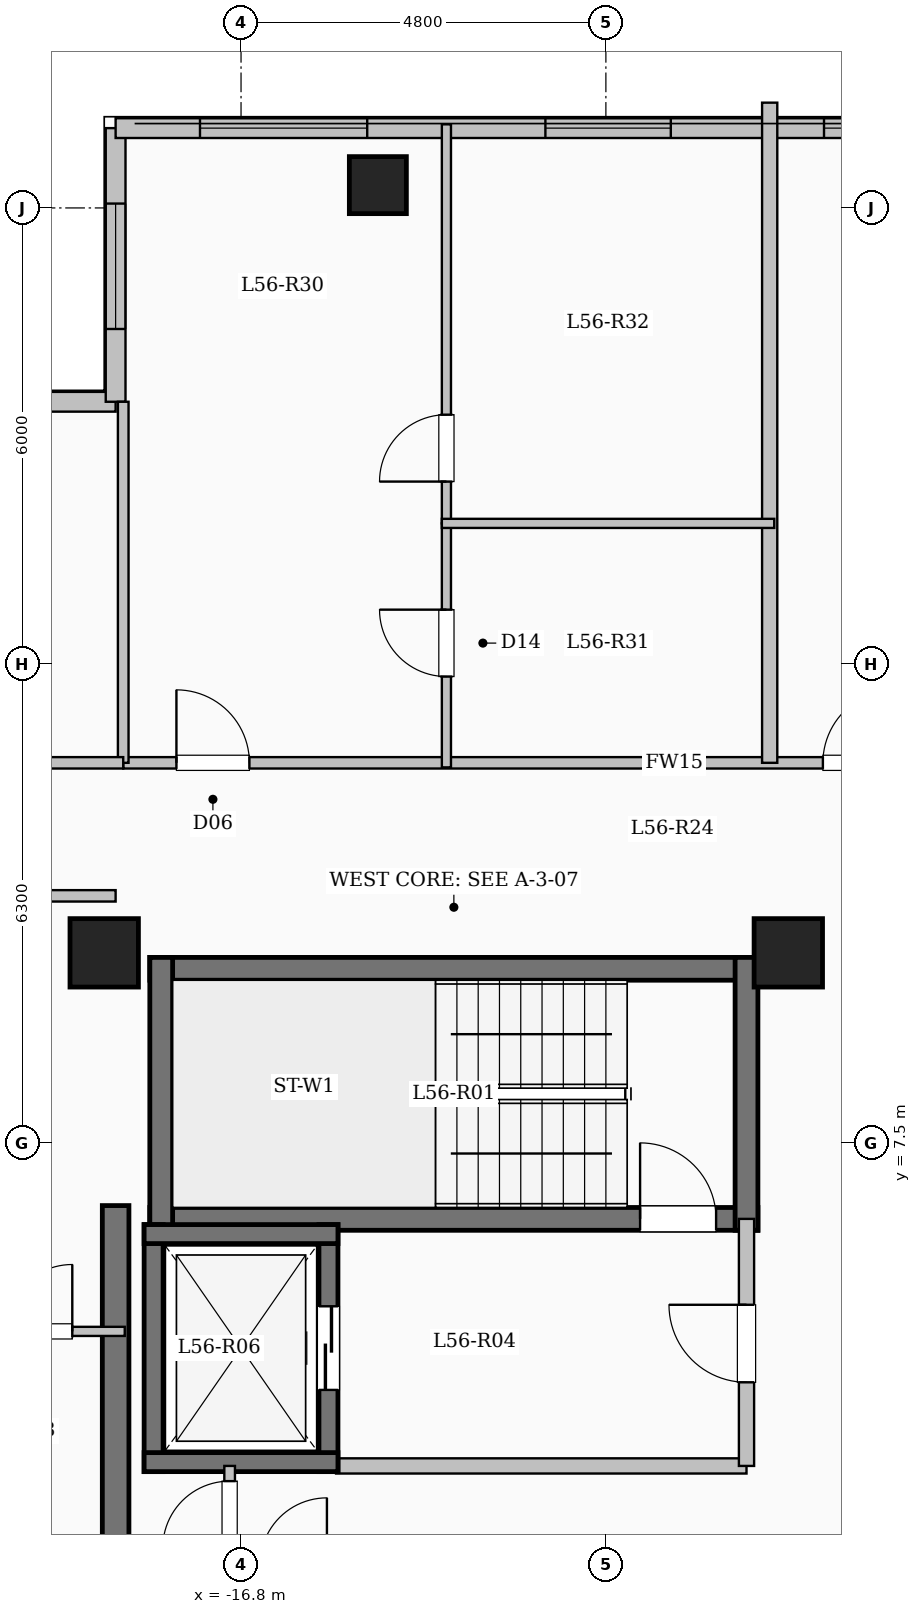
"""IFC4 building model, lengths in metres.
Left out: names, types, materials, properties, quantities, classifications, styles, units other than length and angle.
Written with IfcOpenShell. Run it as: python <this file> out.ifc"""

import sys

from ifc_helpers import new_model, si_unit, direction, frame, frame_2d, origin, origin_2d, place, context, subcontext, project, spatial, rectangle, extrude, element, fill, save


model = new_model("IFC4")
c1 = context("Model", 3, precision=1e-05, world=origin(), true_north=direction((0.0, 1.0)))
c2 = subcontext(c1, "Body", "Model", "MODEL_VIEW")
j1 = project(units=[si_unit("LENGTHUNIT", "METRE"), si_unit("PLANEANGLEUNIT", "RADIAN")], contexts=[c1])
p1 = place(None, origin())
s1 = spatial("IfcSite", under=j1, at=p1, CompositionType="ELEMENT")
p2 = place(p1, origin())
s2 = spatial("IfcBuilding", under=s1, at=p2, CompositionType="ELEMENT")
p3 = place(p2, frame((0.0, 0.0, 207.0)))
s3 = spatial("IfcBuildingStorey", under=s2, at=p3, CompositionType="ELEMENT", Elevation=207.0)
for number, where, z_axis, x_axis in (
    (1, (-9.6, 10.0, 0.0), (0.0, 0.0, 1.0), (1.0, 0.0, 0.0)),
    (2, (-18.6, 10.0, 0.0), (0.0, 0.0, 1.0), (1.0, 0.0, 0.0)),
):
    element("IfcColumn", number, at=place(p3, frame(where, z_axis=z_axis, x_axis=x_axis)), inside=s3, PredefinedType="COLUMN", context=c2, shape_type="SweptSolid", body=[
        extrude(rectangle(XDim=0.9, YDim=0.9, at=origin_2d()), origin(), (0.0, 0.0, 1.0), 3.35),
    ])
p4 = place(p3, frame((-15.0, 20.1, 0.0), z_axis=(0.0, 0.0, 1.0), x_axis=(1.0, 0.0, 0.0)))
e3 = element("IfcColumn", 3, at=p4, inside=s3, PredefinedType="COLUMN", context=c2, shape_type="SweptSolid", body=[
    extrude(rectangle(XDim=0.75, YDim=0.75, at=origin_2d()), origin(), (0.0, 0.0, 1.0), 3.35),
])
p5 = place(p3, frame((-23.55, 17.25, 0.0), z_axis=(0.0, 0.0, 1.0), x_axis=(1.0, 0.0, 0.0)))
e4 = element("IfcWall", 4, at=p5, inside=s3, PredefinedType="SOLIDWALL", context=c2, shape_type="SweptSolid", body=[
    extrude(rectangle(XDim=5.1, YDim=0.26, at=frame_2d((2.55, 0.0))), origin(), (0.0, 0.0, 1.0), 3.1),
])
p6 = place(p5, frame((1.575, 0.0, 0.9)))
e5 = element("IfcOpeningElement", 5, at=p6, cuts=e4, PredefinedType="OPENING", context=c2, shape_type="SweptSolid", body=[
    extrude(rectangle(XDim=2.0, YDim=1.7, at=frame_2d((1.0, 0.85))), frame((0.0, 0.14, 0.0), z_axis=(0.0, -1.0, 0.0), x_axis=(1.0, 0.0, 0.0)), (0.0, 0.0, 1.0), 0.28),
])
p7 = place(p3, frame((-18.45, 17.25, 0.0), z_axis=(0.0, 0.0, 1.0), x_axis=(0.0, 1.0, 0.0)))
e6 = element("IfcWall", 6, at=p7, inside=s3, PredefinedType="SOLIDWALL", context=c2, shape_type="SweptSolid", body=[
    extrude(rectangle(XDim=3.6, YDim=0.26, at=frame_2d((1.8, 0.0))), origin(), (0.0, 0.0, 1.0), 3.1),
])
p8 = place(p7, frame((0.958, 0.0, 0.9)))
e7 = element("IfcOpeningElement", 7, at=p8, cuts=e6, PredefinedType="OPENING", context=c2, shape_type="SweptSolid", body=[
    extrude(rectangle(XDim=1.65, YDim=1.6, at=frame_2d((0.825, 0.8))), frame((0.0, 0.14, 0.0), z_axis=(0.0, -1.0, 0.0), x_axis=(1.0, 0.0, 0.0)), (0.0, 0.0, 1.0), 0.28),
])
p9 = place(p3, frame((-18.45, 20.85, 0.0), z_axis=(0.0, 0.0, 1.0), x_axis=(1.0, 0.0, 0.0)))
e8 = element("IfcWall", 8, at=p9, inside=s3, PredefinedType="SOLIDWALL", context=c2, shape_type="SweptSolid", body=[
    extrude(rectangle(XDim=11.1, YDim=0.26, at=frame_2d((5.55, 0.0))), origin(), (0.0, 0.0, 1.0), 3.1),
])
p10 = place(p9, frame((1.11, 0.0, 0.9)))
e9 = element("IfcOpeningElement", 9, at=p10, cuts=e8, PredefinedType="OPENING", context=c2, shape_type="SweptSolid", body=[
    extrude(rectangle(XDim=2.2, YDim=1.75, at=frame_2d((1.1, 0.875))), frame((0.0, 0.14, 0.0), z_axis=(0.0, -1.0, 0.0), x_axis=(1.0, 0.0, 0.0)), (0.0, 0.0, 1.0), 0.28),
])
p11 = place(p9, frame((5.654, 0.0, 0.9)))
e10 = element("IfcOpeningElement", 10, at=p11, cuts=e8, PredefinedType="OPENING", context=c2, shape_type="SweptSolid", body=[
    extrude(rectangle(XDim=1.65, YDim=1.6, at=frame_2d((0.825, 0.8))), frame((0.0, 0.14, 0.0), z_axis=(0.0, -1.0, 0.0), x_axis=(1.0, 0.0, 0.0)), (0.0, 0.0, 1.0), 0.28),
])
p12 = place(p9, frame((9.32, 0.0, 0.95)))
e11 = element("IfcOpeningElement", 11, at=p12, cuts=e8, PredefinedType="OPENING", context=c2, shape_type="SweptSolid", body=[
    extrude(rectangle(XDim=1.2, YDim=1.5, at=frame_2d((0.6, 0.75))), frame((0.0, 0.14, 0.0), z_axis=(0.0, -1.0, 0.0), x_axis=(1.0, 0.0, 0.0)), (0.0, 0.0, 1.0), 0.28),
])
p13 = place(p3, frame((-18.0, 9.79, 0.0), z_axis=(0.0, 0.0, 1.0), x_axis=(1.0, 0.0, 0.0)))
e12 = element("IfcWall", 12, at=p13, inside=s3, PredefinedType="SHEAR", context=c2, shape_type="SweptSolid", body=[
    extrude(rectangle(XDim=8.0, YDim=0.3, at=frame_2d((4.0, 0.0))), origin(), (0.0, 0.0, 1.0), 3.35),
])
p14 = place(p3, frame((-18.0, 6.5, 0.0), z_axis=(0.0, 0.0, 1.0), x_axis=(1.0, 0.0, 0.0)))
e13 = element("IfcWall", 13, at=p14, inside=s3, PredefinedType="SHEAR", context=c2, shape_type="SweptSolid", body=[
    extrude(rectangle(XDim=8.0, YDim=0.3, at=frame_2d((4.0, 0.0))), origin(), (0.0, 0.0, 1.0), 3.35),
])
p15 = place(p14, frame((6.45, 0.0, 0.0)))
e14 = element("IfcOpeningElement", 14, at=p15, cuts=e13, PredefinedType="OPENING", context=c2, shape_type="SweptSolid", body=[
    extrude(rectangle(XDim=1.0, YDim=2.15, at=frame_2d((0.5, 1.075))), frame((0.0, 0.16, 0.0), z_axis=(0.0, -1.0, 0.0), x_axis=(1.0, 0.0, 0.0)), (0.0, 0.0, 1.0), 0.32),
])
for number, where, z_axis, x_axis in (
    (15, (-17.85, 6.35, 0.0), (0.0, 0.0, 1.0), (0.0, 1.0, 0.0)),
    (16, (-10.15, 6.35, 0.0), (0.0, 0.0, 1.0), (0.0, 1.0, 0.0)),
):
    element("IfcWall", number, at=place(p3, frame(where, z_axis=z_axis, x_axis=x_axis)), inside=s3, PredefinedType="SHEAR", context=c2, shape_type="SweptSolid", body=[
        extrude(rectangle(XDim=3.59, YDim=0.3, at=frame_2d((1.795, 0.0))), origin(), (0.0, 0.0, 1.0), 3.35),
    ])
p16 = place(p3, frame((-15.55, 3.25, 0.0), z_axis=(0.0, 0.0, 1.0), x_axis=(1.0, 0.0, 0.0)))
e17 = element("IfcWall", 17, at=p16, inside=s3, PredefinedType="SOLIDWALL", context=c2, shape_type="SweptSolid", body=[
    extrude(rectangle(XDim=5.4, YDim=0.2, at=frame_2d((2.7, 0.0))), origin(), (0.0, 0.0, 1.0), 3.1),
])
p17 = place(p3, frame((-10.15, 3.25, 0.0), z_axis=(0.0, 0.0, 1.0), x_axis=(0.0, 1.0, 0.0)))
e18 = element("IfcWall", 18, at=p17, inside=s3, PredefinedType="SOLIDWALL", context=c2, shape_type="SweptSolid", body=[
    extrude(rectangle(XDim=3.25, YDim=0.2, at=frame_2d((1.625, 0.0))), origin(), (0.0, 0.0, 1.0), 3.1),
])
p18 = place(p17, frame((1.1, 0.0, 0.0)))
e19 = element("IfcOpeningElement", 19, at=p18, cuts=e18, PredefinedType="OPENING", context=c2, shape_type="SweptSolid", body=[
    extrude(rectangle(XDim=1.02, YDim=2.15, at=frame_2d((0.51, 1.075))), frame((0.0, 0.11, 0.0), z_axis=(0.0, -1.0, 0.0), x_axis=(1.0, 0.0, 0.0)), (0.0, 0.0, 1.0), 0.22),
])
p19 = place(p3, frame((-17.95, 3.175, 0.0), z_axis=(0.0, 0.0, 1.0), x_axis=(0.0, 1.0, 0.0)))
e20 = element("IfcWall", 20, at=p19, inside=s3, PredefinedType="SHEAR", context=c2, shape_type="SweptSolid", body=[
    extrude(rectangle(XDim=3.25, YDim=0.25, at=frame_2d((1.625, 0.0))), origin(), (0.0, 0.0, 1.0), 3.35),
])
p20 = place(p3, frame((-15.65, 3.175, 0.0), z_axis=(0.0, 0.0, 1.0), x_axis=(0.0, 1.0, 0.0)))
e21 = element("IfcWall", 21, at=p20, inside=s3, PredefinedType="SHEAR", context=c2, shape_type="SweptSolid", body=[
    extrude(rectangle(XDim=3.25, YDim=0.25, at=frame_2d((1.625, 0.0))), origin(), (0.0, 0.0, 1.0), 3.35),
])
p21 = place(p20, frame((1.075, 0.0, 0.0)))
e22 = element("IfcOpeningElement", 22, at=p21, cuts=e21, PredefinedType="OPENING", context=c2, shape_type="SweptSolid", body=[
    extrude(rectangle(XDim=1.1, YDim=2.15, at=frame_2d((0.55, 1.075))), frame((0.0, 0.135, 0.0), z_axis=(0.0, -1.0, 0.0), x_axis=(1.0, 0.0, 0.0)), (0.0, 0.0, 1.0), 0.27),
])
for number, where, z_axis, x_axis in (
    (23, (-18.075, 3.3, 0.0), (0.0, 0.0, 1.0), (1.0, 0.0, 0.0)),
    (24, (-18.075, 6.3, 0.0), (0.0, 0.0, 1.0), (1.0, 0.0, 0.0)),
):
    element("IfcWall", number, at=place(p3, frame(where, z_axis=z_axis, x_axis=x_axis)), inside=s3, PredefinedType="SHEAR", context=c2, shape_type="SweptSolid", body=[
        extrude(rectangle(XDim=2.55, YDim=0.25, at=frame_2d((1.275, 0.0))), origin(), (0.0, 0.0, 1.0), 3.35),
    ])
p22 = place(p3, frame((-18.45, -7.375, 0.0), z_axis=(0.0, 0.0, 1.0), x_axis=(0.0, 1.0, 0.0)))
e25 = element("IfcWall", 25, at=p22, inside=s3, PredefinedType="SHEAR", context=c2, shape_type="SweptSolid", body=[
    extrude(rectangle(XDim=14.05, YDim=0.35, at=frame_2d((7.025, 0.0))), origin(), (0.0, 0.0, 1.0), 3.35),
])
p23 = place(p3, frame((-16.95, 1.95, 0.0), z_axis=(0.0, 0.0, 1.0), x_axis=(0.0, 1.0, 0.0)))
e26 = element("IfcWall", 26, at=p23, inside=s3, PredefinedType="PARTITIONING", context=c2, shape_type="SweptSolid", body=[
    extrude(rectangle(XDim=1.3, YDim=0.14, at=frame_2d((0.65, 0.0))), origin(), (0.0, 0.0, 1.0), 3.1),
])
p24 = place(p23, frame((0.22, 0.0, 0.0)))
e27 = element("IfcOpeningElement", 27, at=p24, cuts=e26, PredefinedType="OPENING", context=c2, shape_type="SweptSolid", body=[
    extrude(rectangle(XDim=0.88, YDim=2.1, at=frame_2d((0.44, 1.05))), frame((0.0, 0.08, 0.0), z_axis=(0.0, -1.0, 0.0), x_axis=(1.0, 0.0, 0.0)), (0.0, 0.0, 1.0), 0.16),
])
p25 = place(p3, frame((-18.35, 12.5, 0.0), z_axis=(0.0, 0.0, 1.0), x_axis=(1.0, 0.0, 0.0)))
e28 = element("IfcWall", 28, at=p25, inside=s3, PredefinedType="PARTITIONING", context=c2, shape_type="SweptSolid", body=[
    extrude(rectangle(XDim=14.5, YDim=0.15, at=frame_2d((7.25, 0.0))), origin(), (0.0, 0.0, 1.0), 3.1),
])
p26 = place(p25, frame((0.7, 0.0, 0.0)))
e29 = element("IfcOpeningElement", 29, at=p26, cuts=e28, PredefinedType="OPENING", context=c2, shape_type="SweptSolid", body=[
    extrude(rectangle(XDim=0.96, YDim=2.15, at=frame_2d((0.48, 1.075))), frame((0.0, 0.085, 0.0), z_axis=(0.0, -1.0, 0.0), x_axis=(1.0, 0.0, 0.0)), (0.0, 0.0, 1.0), 0.17),
])
p27 = place(p25, frame((9.205, 0.0, 0.0)))
e30 = element("IfcOpeningElement", 30, at=p27, cuts=e28, PredefinedType="OPENING", context=c2, shape_type="SweptSolid", body=[
    extrude(rectangle(XDim=0.96, YDim=2.15, at=frame_2d((0.48, 1.075))), frame((0.0, 0.085, 0.0), z_axis=(0.0, -1.0, 0.0), x_axis=(1.0, 0.0, 0.0)), (0.0, 0.0, 1.0), 0.17),
])
p28 = place(p3, frame((-9.845, 12.5, 0.0), z_axis=(0.0, 0.0, 1.0), x_axis=(0.0, 1.0, 0.0)))
e31 = element("IfcWall", 31, at=p28, inside=s3, PredefinedType="SOLIDWALL", context=c2, shape_type="SweptSolid", body=[
    extrude(rectangle(XDim=8.685, YDim=0.2, at=frame_2d((4.343, 0.0))), origin(), (0.0, 0.0, 1.0), 3.1),
])
p29 = place(p3, frame((-14.098, 12.44, 0.0), z_axis=(0.0, 0.0, 1.0), x_axis=(0.0, 1.0, 0.0)))
e32 = element("IfcWall", 32, at=p29, inside=s3, PredefinedType="PARTITIONING", context=c2, shape_type="SweptSolid", body=[
    extrude(rectangle(XDim=3.21, YDim=0.12, at=frame_2d((1.605, 0.0))), origin(), (0.0, 0.0, 1.0), 3.1),
])
p30 = place(p29, frame((1.195, 0.0, 0.0)))
e33 = element("IfcOpeningElement", 33, at=p30, cuts=e32, PredefinedType="OPENING", context=c2, shape_type="SweptSolid", body=[
    extrude(rectangle(XDim=0.88, YDim=2.1, at=frame_2d((0.44, 1.05))), frame((0.0, 0.07, 0.0), z_axis=(0.0, -1.0, 0.0), x_axis=(1.0, 0.0, 0.0)), (0.0, 0.0, 1.0), 0.14),
])
p31 = place(p3, frame((-14.098, 15.65, 0.0), z_axis=(0.0, 0.0, 1.0), x_axis=(0.0, 1.0, 0.0)))
e34 = element("IfcWall", 34, at=p31, inside=s3, PredefinedType="PARTITIONING", context=c2, shape_type="SweptSolid", body=[
    extrude(rectangle(XDim=5.25, YDim=0.12, at=frame_2d((2.625, 0.0))), origin(), (0.0, 0.0, 1.0), 3.1),
])
p32 = place(p31, frame((0.55, 0.0, 0.0)))
e35 = element("IfcOpeningElement", 35, at=p32, cuts=e34, PredefinedType="OPENING", context=c2, shape_type="SweptSolid", body=[
    extrude(rectangle(XDim=0.88, YDim=2.1, at=frame_2d((0.44, 1.05))), frame((0.0, 0.07, 0.0), z_axis=(0.0, -1.0, 0.0), x_axis=(1.0, 0.0, 0.0)), (0.0, 0.0, 1.0), 0.14),
])
p33 = place(p3, frame((-14.158, 15.65, 0.0), z_axis=(0.0, 0.0, 1.0), x_axis=(1.0, 0.0, 0.0)))
e36 = element("IfcWall", 36, at=p33, inside=s3, PredefinedType="PARTITIONING", context=c2, shape_type="SweptSolid", body=[
    extrude(rectangle(XDim=4.373, YDim=0.12, at=frame_2d((2.187, 0.0))), origin(), (0.0, 0.0, 1.0), 2.725),
])
p34 = place(p3, frame((-23.58, 10.75, 0.0), z_axis=(0.0, 0.0, 1.0), x_axis=(1.0, 0.0, 0.0)))
e37 = element("IfcWall", 37, at=p34, inside=s3, PredefinedType="PARTITIONING", context=c2, shape_type="SweptSolid", body=[
    extrude(rectangle(XDim=5.13, YDim=0.15, at=frame_2d((2.565, 0.0))), origin(), (0.0, 0.0, 1.0), 3.1),
])
p35 = place(p3, frame((-18.35, 12.5, 0.0), z_axis=(0.0, 0.0, 1.0), x_axis=(0.0, 1.0, 0.0)))
e38 = element("IfcWall", 38, at=p35, inside=s3, PredefinedType="PARTITIONING", context=c2, shape_type="SweptSolid", body=[
    extrude(rectangle(XDim=4.75, YDim=0.14, at=frame_2d((2.375, 0.0))), origin(), (0.0, 0.0, 1.0), 3.1),
])
p36 = place(p3, frame((-23.58, 12.5, 0.0), z_axis=(0.0, 0.0, 1.0), x_axis=(1.0, 0.0, 0.0)))
e39 = element("IfcWall", 39, at=p36, inside=s3, PredefinedType="PARTITIONING", context=c2, shape_type="SweptSolid", body=[
    extrude(rectangle(XDim=5.23, YDim=0.15, at=frame_2d((2.615, 0.0))), origin(), (0.0, 0.0, 1.0), 3.1),
])
p37 = place(p36, frame((2.14, 0.0, 0.0)))
e40 = element("IfcOpeningElement", 40, at=p37, cuts=e39, PredefinedType="OPENING", context=c2, shape_type="SweptSolid", body=[
    extrude(rectangle(XDim=0.95, YDim=2.15, at=frame_2d((0.475, 1.075))), frame((0.0, 0.085, 0.0), z_axis=(0.0, -1.0, 0.0), x_axis=(1.0, 0.0, 0.0)), (0.0, 0.0, 1.0), 0.17),
])
p38 = place(p3, frame((-23.7, 5.02, 0.0), z_axis=(0.0, 0.0, 1.0), x_axis=(1.0, 0.0, 0.0)))
e41 = element("IfcWall", 41, at=p38, inside=s3, PredefinedType="PARTITIONING", context=c2, shape_type="SweptSolid", body=[
    extrude(rectangle(XDim=5.37, YDim=0.12, at=frame_2d((2.685, 0.0))), origin(), (0.0, 0.0, 1.0), 3.1),
])
p39 = place(p38, frame((3.8, 0.0, 0.0)))
e42 = element("IfcOpeningElement", 42, at=p39, cuts=e41, PredefinedType="OPENING", context=c2, shape_type="SweptSolid", body=[
    extrude(rectangle(XDim=0.88, YDim=2.1, at=frame_2d((0.44, 1.05))), frame((0.0, 0.07, 0.0), z_axis=(0.0, -1.0, 0.0), x_axis=(1.0, 0.0, 0.0)), (0.0, 0.0, 1.0), 0.14),
])
p40 = place(p8, origin())
e43 = element("IfcWindow", 43, at=p40, inside=s3, PartitioningType="SINGLE_PANEL", PredefinedType="WINDOW", context=c2, shape_type="SweptSolid", body=[
    extrude(rectangle(XDim=1.65, YDim=1.6, at=frame_2d((0.825, 0.8))), frame((0.0, 0.03, 0.0), z_axis=(0.0, -1.0, 0.0), x_axis=(1.0, 0.0, 0.0)), (0.0, 0.0, 1.0), 0.06),
])
fill(e7, e43)
p41 = place(p10, origin())
e44 = element("IfcWindow", 44, at=p41, inside=s3, PartitioningType="SINGLE_PANEL", PredefinedType="WINDOW", context=c2, shape_type="SweptSolid", body=[
    extrude(rectangle(XDim=2.2, YDim=1.75, at=frame_2d((1.1, 0.875))), frame((0.0, 0.03, 0.0), z_axis=(0.0, -1.0, 0.0), x_axis=(1.0, 0.0, 0.0)), (0.0, 0.0, 1.0), 0.06),
])
fill(e9, e44)
p42 = place(p11, origin())
e45 = element("IfcWindow", 45, at=p42, inside=s3, PartitioningType="SINGLE_PANEL", PredefinedType="WINDOW", context=c2, shape_type="SweptSolid", body=[
    extrude(rectangle(XDim=1.65, YDim=1.6, at=frame_2d((0.825, 0.8))), frame((0.0, 0.03, 0.0), z_axis=(0.0, -1.0, 0.0), x_axis=(1.0, 0.0, 0.0)), (0.0, 0.0, 1.0), 0.06),
])
fill(e10, e45)
p43 = place(p12, origin())
e46 = element("IfcWindow", 46, at=p43, inside=s3, PartitioningType="SINGLE_PANEL", PredefinedType="WINDOW", context=c2, shape_type="SweptSolid", body=[
    extrude(rectangle(XDim=1.2, YDim=1.5, at=frame_2d((0.6, 0.75))), frame((0.0, 0.03, 0.0), z_axis=(0.0, -1.0, 0.0), x_axis=(1.0, 0.0, 0.0)), (0.0, 0.0, 1.0), 0.06),
])
fill(e11, e46)
p44 = place(p15, origin())
e47 = element("IfcDoor", 47, at=p44, inside=s3, OperationType="SINGLE_SWING_LEFT", PredefinedType="DOOR", context=c2, shape_type="SweptSolid", body=[
    extrude(rectangle(XDim=1.0, YDim=2.15, at=frame_2d((0.5, 1.075))), frame((0.0, 0.025, 0.0), z_axis=(0.0, -1.0, 0.0), x_axis=(1.0, 0.0, 0.0)), (0.0, 0.0, 1.0), 0.05),
])
fill(e14, e47)
p45 = place(p18, origin())
e48 = element("IfcDoor", 48, at=p45, inside=s3, OperationType="SINGLE_SWING_RIGHT", PredefinedType="DOOR", context=c2, shape_type="SweptSolid", body=[
    extrude(rectangle(XDim=1.02, YDim=2.15, at=frame_2d((0.51, 1.075))), frame((0.0, 0.025, 0.0), z_axis=(0.0, -1.0, 0.0), x_axis=(1.0, 0.0, 0.0)), (0.0, 0.0, 1.0), 0.05),
])
fill(e19, e48)
p46 = place(p21, origin())
e49 = element("IfcDoor", 49, at=p46, inside=s3, OperationType="SLIDING_TO_LEFT", PredefinedType="DOOR", context=c2, shape_type="SweptSolid", body=[
    extrude(rectangle(XDim=1.1, YDim=2.15, at=frame_2d((0.55, 1.075))), frame((0.0, 0.025, 0.0), z_axis=(0.0, -1.0, 0.0), x_axis=(1.0, 0.0, 0.0)), (0.0, 0.0, 1.0), 0.05),
])
fill(e22, e49)
p47 = place(p24, origin())
e50 = element("IfcDoor", 50, at=p47, inside=s3, OperationType="SINGLE_SWING_LEFT", PredefinedType="DOOR", context=c2, shape_type="SweptSolid", body=[
    extrude(rectangle(XDim=0.88, YDim=2.1, at=frame_2d((0.44, 1.05))), frame((0.0, 0.025, 0.0), z_axis=(0.0, -1.0, 0.0), x_axis=(1.0, 0.0, 0.0)), (0.0, 0.0, 1.0), 0.05),
])
fill(e27, e50)
p48 = place(p26, origin())
e51 = element("IfcDoor", 51, at=p48, inside=s3, OperationType="SINGLE_SWING_LEFT", PredefinedType="DOOR", context=c2, shape_type="SweptSolid", body=[
    extrude(rectangle(XDim=0.96, YDim=2.15, at=frame_2d((0.48, 1.075))), frame((0.0, 0.025, 0.0), z_axis=(0.0, -1.0, 0.0), x_axis=(1.0, 0.0, 0.0)), (0.0, 0.0, 1.0), 0.05),
])
fill(e29, e51)
p49 = place(p30, origin())
e52 = element("IfcDoor", 52, at=p49, inside=s3, OperationType="SINGLE_SWING_RIGHT", PredefinedType="DOOR", context=c2, shape_type="SweptSolid", body=[
    extrude(rectangle(XDim=0.88, YDim=2.1, at=frame_2d((0.44, 1.05))), frame((0.0, 0.025, 0.0), z_axis=(0.0, -1.0, 0.0), x_axis=(1.0, 0.0, 0.0)), (0.0, 0.0, 1.0), 0.05),
])
fill(e33, e52)
p50 = place(p32, origin())
e53 = element("IfcDoor", 53, at=p50, inside=s3, OperationType="SINGLE_SWING_LEFT", PredefinedType="DOOR", context=c2, shape_type="SweptSolid", body=[
    extrude(rectangle(XDim=0.88, YDim=2.1, at=frame_2d((0.44, 1.05))), frame((0.0, 0.025, 0.0), z_axis=(0.0, -1.0, 0.0), x_axis=(1.0, 0.0, 0.0)), (0.0, 0.0, 1.0), 0.05),
])
fill(e35, e53)
p51 = place(p27, origin())
e54 = element("IfcDoor", 54, at=p51, inside=s3, OperationType="SINGLE_SWING_RIGHT", PredefinedType="DOOR", context=c2, shape_type="SweptSolid", body=[
    extrude(rectangle(XDim=0.96, YDim=2.15, at=frame_2d((0.48, 1.075))), frame((0.0, 0.025, 0.0), z_axis=(0.0, -1.0, 0.0), x_axis=(1.0, 0.0, 0.0)), (0.0, 0.0, 1.0), 0.05),
])
fill(e30, e54)
p52 = place(p39, origin())
e55 = element("IfcDoor", 55, at=p52, inside=s3, OperationType="SINGLE_SWING_RIGHT", PredefinedType="DOOR", context=c2, shape_type="SweptSolid", body=[
    extrude(rectangle(XDim=0.88, YDim=2.1, at=frame_2d((0.44, 1.05))), frame((0.0, 0.025, 0.0), z_axis=(0.0, -1.0, 0.0), x_axis=(1.0, 0.0, 0.0)), (0.0, 0.0, 1.0), 0.05),
])
fill(e42, e55)
save(model, sys.argv[1])
